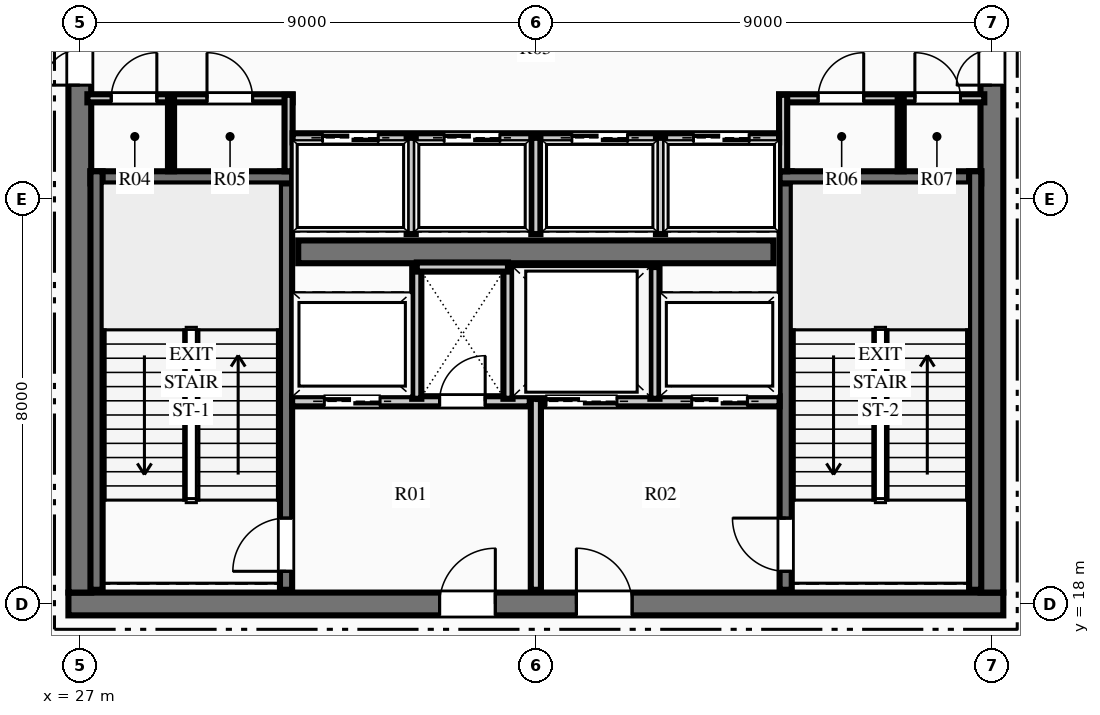
"""IFC4 building model, lengths in metres.
Left out: names, types, materials, properties, quantities, classifications, styles, units other than length and angle.
Written with IfcOpenShell. Run it as: python <this file> out.ifc"""

import sys

from ifc_helpers import new_model, si_unit, direction, frame, frame_2d, origin, place, context, subcontext, project, spatial, rectangle, extrude, element, fill, save


model = new_model("IFC4")
c1 = context("Model", 3, precision=1e-05, world=origin(), true_north=direction((0.0, 1.0)))
c2 = subcontext(c1, "Body", "Model", "MODEL_VIEW")
j1 = project(units=[si_unit("LENGTHUNIT", "METRE"), si_unit("PLANEANGLEUNIT", "RADIAN")], contexts=[c1])
p1 = place(None, origin())
s1 = spatial("IfcSite", under=j1, at=p1, CompositionType="ELEMENT")
p2 = place(p1, origin())
s2 = spatial("IfcBuilding", under=s1, at=p2, CompositionType="ELEMENT")
p3 = place(p2, frame((0.0, 0.0, 298.2)))
s3 = spatial("IfcBuildingStorey", under=s2, at=p3, CompositionType="ELEMENT", Elevation=298.2)
p4 = place(p3, frame((26.775, 18.0, 0.0), z_axis=(0.0, 0.0, 1.0), x_axis=(1.0, 0.0, 0.0)))
e1 = element("IfcWall", 1, at=p4, inside=s3, PredefinedType="SHEAR", context=c2, shape_type="SweptSolid", body=[
    extrude(rectangle(XDim=18.45, YDim=0.45, at=frame_2d((9.225, 0.0))), origin(), (0.0, 0.0, 1.0), 4.5),
])
p5 = place(p4, frame((7.325, 0.0, 0.0)))
e2 = element("IfcOpeningElement", 2, at=p5, cuts=e1, PredefinedType="OPENING", context=c2, shape_type="SweptSolid", body=[
    extrude(rectangle(XDim=1.1, YDim=2.15, at=frame_2d((0.55, 1.075))), frame((0.0, 0.235, 0.0), z_axis=(0.0, -1.0, 0.0), x_axis=(1.0, 0.0, 0.0)), (0.0, 0.0, 1.0), 0.47),
])
p6 = place(p4, frame((10.025, 0.0, 0.0)))
e3 = element("IfcOpeningElement", 3, at=p6, cuts=e1, PredefinedType="OPENING", context=c2, shape_type="SweptSolid", body=[
    extrude(rectangle(XDim=1.1, YDim=2.15, at=frame_2d((0.55, 1.075))), frame((0.0, 0.235, 0.0), z_axis=(0.0, -1.0, 0.0), x_axis=(1.0, 0.0, 0.0)), (0.0, 0.0, 1.0), 0.47),
])
p7 = place(p3, frame((27.0, 18.225, 0.0), z_axis=(0.0, 0.0, 1.0), x_axis=(0.0, 1.0, 0.0)))
e4 = element("IfcWall", 4, at=p7, inside=s3, PredefinedType="SHEAR", context=c2, shape_type="SweptSolid", body=[
    extrude(rectangle(XDim=15.55, YDim=0.45, at=frame_2d((7.775, 0.0))), origin(), (0.0, 0.0, 1.0), 4.5),
])
p8 = place(p7, frame((10.015, 0.0, 0.0)))
e5 = element("IfcOpeningElement", 5, at=p8, cuts=e4, PredefinedType="OPENING", context=c2, shape_type="SweptSolid", body=[
    extrude(rectangle(XDim=1.4, YDim=2.2, at=frame_2d((0.7, 1.1))), frame((0.0, 0.235, 0.0), z_axis=(0.0, -1.0, 0.0), x_axis=(1.0, 0.0, 0.0)), (0.0, 0.0, 1.0), 0.47),
])
p9 = place(p3, frame((45.0, 18.225, 0.0), z_axis=(0.0, 0.0, 1.0), x_axis=(0.0, 1.0, 0.0)))
e6 = element("IfcWall", 6, at=p9, inside=s3, PredefinedType="SHEAR", context=c2, shape_type="SweptSolid", body=[
    extrude(rectangle(XDim=15.55, YDim=0.45, at=frame_2d((7.775, 0.0))), origin(), (0.0, 0.0, 1.0), 4.5),
])
p10 = place(p9, frame((10.015, 0.0, 0.0)))
e7 = element("IfcOpeningElement", 7, at=p10, cuts=e6, PredefinedType="OPENING", context=c2, shape_type="SweptSolid", body=[
    extrude(rectangle(XDim=1.4, YDim=2.2, at=frame_2d((0.7, 1.1))), frame((0.0, 0.235, 0.0), z_axis=(0.0, -1.0, 0.0), x_axis=(1.0, 0.0, 0.0)), (0.0, 0.0, 1.0), 0.47),
])
p11 = place(p3, frame((31.31, 24.95, 0.0), z_axis=(0.0, 0.0, 1.0), x_axis=(1.0, 0.0, 0.0)))
e8 = element("IfcWall", 8, at=p11, inside=s3, PredefinedType="SHEAR", context=c2, shape_type="SweptSolid", body=[
    extrude(rectangle(XDim=9.38, YDim=0.45, at=frame_2d((4.69, 0.0))), origin(), (0.0, 0.0, 1.0), 4.5),
])
p12 = place(p3, frame((31.07, 18.28, 0.0), z_axis=(0.0, 0.0, 1.0), x_axis=(0.0, 1.0, 0.0)))
e9 = element("IfcWall", 9, at=p12, inside=s3, PredefinedType="SHEAR", context=c2, shape_type="SweptSolid", body=[
    extrude(rectangle(XDim=8.26, YDim=0.24, at=frame_2d((4.13, 0.0))), origin(), (0.0, 0.0, 1.0), 4.5),
])
p13 = place(p12, frame((0.365, 0.0, 0.0)))
e10 = element("IfcOpeningElement", 10, at=p13, cuts=e9, PredefinedType="OPENING", context=c2, shape_type="SweptSolid", body=[
    extrude(rectangle(XDim=1.05, YDim=2.15, at=frame_2d((0.525, 1.075))), frame((0.0, 0.13, 0.0), z_axis=(0.0, -1.0, 0.0), x_axis=(1.0, 0.0, 0.0)), (0.0, 0.0, 1.0), 0.26),
])
p14 = place(p3, frame((27.21, 26.42, 0.0), z_axis=(0.0, 0.0, 1.0), x_axis=(1.0, 0.0, 0.0)))
e11 = element("IfcWall", 11, at=p14, inside=s3, PredefinedType="SHEAR", context=c2, shape_type="SweptSolid", body=[
    extrude(rectangle(XDim=3.98, YDim=0.24, at=frame_2d((1.99, 0.0))), origin(), (0.0, 0.0, 1.0), 4.5),
])
p15 = place(p3, frame((27.33, 18.28, 0.0), z_axis=(0.0, 0.0, 1.0), x_axis=(0.0, 1.0, 0.0)))
e12 = element("IfcWall", 12, at=p15, inside=s3, PredefinedType="SHEAR", context=c2, shape_type="SweptSolid", body=[
    extrude(rectangle(XDim=8.26, YDim=0.24, at=frame_2d((4.13, 0.0))), origin(), (0.0, 0.0, 1.0), 4.5),
])
p16 = place(p3, frame((40.93, 18.28, 0.0), z_axis=(0.0, 0.0, 1.0), x_axis=(0.0, 1.0, 0.0)))
e13 = element("IfcWall", 13, at=p16, inside=s3, PredefinedType="SHEAR", context=c2, shape_type="SweptSolid", body=[
    extrude(rectangle(XDim=8.26, YDim=0.24, at=frame_2d((4.13, 0.0))), origin(), (0.0, 0.0, 1.0), 4.5),
])
p17 = place(p16, frame((0.365, 0.0, 0.0)))
e14 = element("IfcOpeningElement", 14, at=p17, cuts=e13, PredefinedType="OPENING", context=c2, shape_type="SweptSolid", body=[
    extrude(rectangle(XDim=1.05, YDim=2.15, at=frame_2d((0.525, 1.075))), frame((0.0, 0.13, 0.0), z_axis=(0.0, -1.0, 0.0), x_axis=(1.0, 0.0, 0.0)), (0.0, 0.0, 1.0), 0.26),
])
p18 = place(p3, frame((40.81, 26.42, 0.0), z_axis=(0.0, 0.0, 1.0), x_axis=(1.0, 0.0, 0.0)))
e15 = element("IfcWall", 15, at=p18, inside=s3, PredefinedType="SHEAR", context=c2, shape_type="SweptSolid", body=[
    extrude(rectangle(XDim=3.98, YDim=0.24, at=frame_2d((1.99, 0.0))), origin(), (0.0, 0.0, 1.0), 4.5),
])
p19 = place(p3, frame((44.67, 18.28, 0.0), z_axis=(0.0, 0.0, 1.0), x_axis=(0.0, 1.0, 0.0)))
e16 = element("IfcWall", 16, at=p19, inside=s3, PredefinedType="SHEAR", context=c2, shape_type="SweptSolid", body=[
    extrude(rectangle(XDim=8.26, YDim=0.24, at=frame_2d((4.13, 0.0))), origin(), (0.0, 0.0, 1.0), 4.5),
])
p20 = place(p3, frame((36.0, 18.28, 0.0), z_axis=(0.0, 0.0, 1.0), x_axis=(0.0, 1.0, 0.0)))
e17 = element("IfcWall", 17, at=p20, inside=s3, PredefinedType="PARTITIONING", context=c2, shape_type="SweptSolid", body=[
    extrude(rectangle(XDim=3.77, YDim=0.2, at=frame_2d((1.885, 0.0))), origin(), (0.0, 0.0, 1.0), 4.24),
])
p21 = place(p3, frame((31.19, 22.0, 0.0), z_axis=(0.0, 0.0, 1.0), x_axis=(1.0, 0.0, 0.0)))
e18 = element("IfcWall", 18, at=p21, inside=s3, PredefinedType="PARTITIONING", context=c2, shape_type="SweptSolid", body=[
    extrude(rectangle(XDim=4.69, YDim=0.2, at=frame_2d((2.345, 0.0))), origin(), (0.0, 0.0, 1.0), 4.24),
])
p22 = place(p21, frame((2.91, 0.0, 0.0)))
e19 = element("IfcOpeningElement", 19, at=p22, cuts=e18, PredefinedType="OPENING", context=c2, shape_type="SweptSolid", body=[
    extrude(rectangle(XDim=0.9, YDim=2.15, at=frame_2d((0.45, 1.075))), frame((0.0, 0.11, 0.0), z_axis=(0.0, -1.0, 0.0), x_axis=(1.0, 0.0, 0.0)), (0.0, 0.0, 1.0), 0.22),
])
p23 = place(p21, frame((0.635, 0.0, 0.0)))
e20 = element("IfcOpeningElement", 20, at=p23, cuts=e18, PredefinedType="OPENING", context=c2, shape_type="SweptSolid", body=[
    extrude(rectangle(XDim=1.1, YDim=2.15, at=frame_2d((0.55, 1.075))), frame((0.0, 0.11, 0.0), z_axis=(0.0, -1.0, 0.0), x_axis=(1.0, 0.0, 0.0)), (0.0, 0.0, 1.0), 0.22),
])
p24 = place(p3, frame((36.12, 22.0, 0.0), z_axis=(0.0, 0.0, 1.0), x_axis=(1.0, 0.0, 0.0)))
e21 = element("IfcWall", 21, at=p24, inside=s3, PredefinedType="PARTITIONING", context=c2, shape_type="SweptSolid", body=[
    extrude(rectangle(XDim=4.69, YDim=0.2, at=frame_2d((2.345, 0.0))), origin(), (0.0, 0.0, 1.0), 4.24),
])
p25 = place(p24, frame((2.955, 0.0, 0.0)))
e22 = element("IfcOpeningElement", 22, at=p25, cuts=e21, PredefinedType="OPENING", context=c2, shape_type="SweptSolid", body=[
    extrude(rectangle(XDim=1.1, YDim=2.15, at=frame_2d((0.55, 1.075))), frame((0.0, 0.11, 0.0), z_axis=(0.0, -1.0, 0.0), x_axis=(1.0, 0.0, 0.0)), (0.0, 0.0, 1.0), 0.22),
])
p26 = place(p24, frame((0.08, 0.0, 0.0)))
e23 = element("IfcOpeningElement", 23, at=p26, cuts=e21, PredefinedType="OPENING", context=c2, shape_type="SweptSolid", body=[
    extrude(rectangle(XDim=1.4, YDim=2.2, at=frame_2d((0.7, 1.1))), frame((0.0, 0.11, 0.0), z_axis=(0.0, -1.0, 0.0), x_axis=(1.0, 0.0, 0.0)), (0.0, 0.0, 1.0), 0.22),
])
for number, where, z_axis, x_axis in (
    (24, (33.65, 22.05, 0.0), (0.0, 0.0, 1.0), (0.0, 1.0, 0.0)),
    (25, (35.45, 22.05, 0.0), (0.0, 0.0, 1.0), (0.0, 1.0, 0.0)),
):
    element("IfcWall", number, at=place(p3, frame(where, z_axis=z_axis, x_axis=x_axis)), inside=s3, PredefinedType="PARTITIONING", context=c2, shape_type="SweptSolid", body=[
        extrude(rectangle(XDim=2.6, YDim=0.18, at=frame_2d((1.3, 0.0))), origin(), (0.0, 0.0, 1.0), 4.24),
    ])
p27 = place(p3, frame((33.65, 24.65, 0.0), z_axis=(0.0, 0.0, 1.0), x_axis=(1.0, 0.0, 0.0)))
e26 = element("IfcWall", 26, at=p27, inside=s3, PredefinedType="PARTITIONING", context=c2, shape_type="SweptSolid", body=[
    extrude(rectangle(XDim=1.8, YDim=0.18, at=frame_2d((0.9, 0.0))), origin(), (0.0, 0.0, 1.0), 4.24),
])
p28 = place(p3, frame((38.35, 22.05, 0.0), z_axis=(0.0, 0.0, 1.0), x_axis=(0.0, 1.0, 0.0)))
e27 = element("IfcWall", 27, at=p28, inside=s3, PredefinedType="PARTITIONING", context=c2, shape_type="SweptSolid", body=[
    extrude(rectangle(XDim=2.6, YDim=0.18, at=frame_2d((1.3, 0.0))), origin(), (0.0, 0.0, 1.0), 4.24),
])
p29 = place(p3, frame((27.15, 27.98, 0.0), z_axis=(0.0, 0.0, 1.0), x_axis=(1.0, 0.0, 0.0)))
e28 = element("IfcWall", 28, at=p29, inside=s3, PredefinedType="PARTITIONING", context=c2, shape_type="SweptSolid", body=[
    extrude(rectangle(XDim=4.05, YDim=0.16, at=frame_2d((2.025, 0.0))), origin(), (0.0, 0.0, 1.0), 4.24),
])
p30 = place(p29, frame((0.47, 0.0, 0.0)))
e29 = element("IfcOpeningElement", 29, at=p30, cuts=e28, PredefinedType="OPENING", context=c2, shape_type="SweptSolid", body=[
    extrude(rectangle(XDim=0.9, YDim=2.15, at=frame_2d((0.45, 1.075))), frame((0.0, 0.09, 0.0), z_axis=(0.0, -1.0, 0.0), x_axis=(1.0, 0.0, 0.0)), (0.0, 0.0, 1.0), 0.18),
])
p31 = place(p29, frame((2.36, 0.0, 0.0)))
e30 = element("IfcOpeningElement", 30, at=p31, cuts=e28, PredefinedType="OPENING", context=c2, shape_type="SweptSolid", body=[
    extrude(rectangle(XDim=0.9, YDim=2.15, at=frame_2d((0.45, 1.075))), frame((0.0, 0.09, 0.0), z_axis=(0.0, -1.0, 0.0), x_axis=(1.0, 0.0, 0.0)), (0.0, 0.0, 1.0), 0.18),
])
p32 = place(p3, frame((31.12, 26.54, 0.0), z_axis=(0.0, 0.0, 1.0), x_axis=(0.0, 1.0, 0.0)))
e31 = element("IfcWall", 31, at=p32, inside=s3, PredefinedType="PARTITIONING", context=c2, shape_type="SweptSolid", body=[
    extrude(rectangle(XDim=1.51, YDim=0.16, at=frame_2d((0.755, 0.0))), origin(), (0.0, 0.0, 1.0), 4.24),
])
p33 = place(p3, frame((40.8, 27.98, 0.0), z_axis=(0.0, 0.0, 1.0), x_axis=(1.0, 0.0, 0.0)))
e32 = element("IfcWall", 32, at=p33, inside=s3, PredefinedType="PARTITIONING", context=c2, shape_type="SweptSolid", body=[
    extrude(rectangle(XDim=4.05, YDim=0.16, at=frame_2d((2.025, 0.0))), origin(), (0.0, 0.0, 1.0), 4.24),
])
p34 = place(p33, frame((0.77, 0.0, 0.0)))
e33 = element("IfcOpeningElement", 33, at=p34, cuts=e32, PredefinedType="OPENING", context=c2, shape_type="SweptSolid", body=[
    extrude(rectangle(XDim=0.9, YDim=2.15, at=frame_2d((0.45, 1.075))), frame((0.0, 0.09, 0.0), z_axis=(0.0, -1.0, 0.0), x_axis=(1.0, 0.0, 0.0)), (0.0, 0.0, 1.0), 0.18),
])
p35 = place(p33, frame((2.68, 0.0, 0.0)))
e34 = element("IfcOpeningElement", 34, at=p35, cuts=e32, PredefinedType="OPENING", context=c2, shape_type="SweptSolid", body=[
    extrude(rectangle(XDim=0.9, YDim=2.15, at=frame_2d((0.45, 1.075))), frame((0.0, 0.09, 0.0), z_axis=(0.0, -1.0, 0.0), x_axis=(1.0, 0.0, 0.0)), (0.0, 0.0, 1.0), 0.18),
])
p36 = place(p3, frame((40.88, 26.54, 0.0), z_axis=(0.0, 0.0, 1.0), x_axis=(0.0, 1.0, 0.0)))
e35 = element("IfcWall", 35, at=p36, inside=s3, PredefinedType="PARTITIONING", context=c2, shape_type="SweptSolid", body=[
    extrude(rectangle(XDim=1.51, YDim=0.16, at=frame_2d((0.755, 0.0))), origin(), (0.0, 0.0, 1.0), 4.24),
])
for number, where, z_axis, x_axis in (
    (36, (28.8, 26.54, 0.0), (0.0, 0.0, 1.0), (0.0, 1.0, 0.0)),
    (37, (43.2, 26.54, 0.0), (0.0, 0.0, 1.0), (0.0, 1.0, 0.0)),
):
    element("IfcWall", number, at=place(p3, frame(where, z_axis=z_axis, x_axis=x_axis)), inside=s3, PredefinedType="PARTITIONING", context=c2, shape_type="SweptSolid", body=[
        extrude(rectangle(XDim=1.44, YDim=0.12, at=frame_2d((0.72, 0.0))), origin(), (0.0, 0.0, 1.0), 4.24),
    ])
p37 = place(p3, frame((31.2, 27.2, 0.0), z_axis=(0.0, 0.0, 1.0), x_axis=(1.0, 0.0, 0.0)))
e38 = element("IfcWall", 38, at=p37, inside=s3, PredefinedType="PARTITIONING", context=c2, shape_type="SweptSolid", body=[
    extrude(rectangle(XDim=9.6, YDim=0.18, at=frame_2d((4.8, 0.0))), origin(), (0.0, 0.0, 1.0), 4.24),
])
p38 = place(p37, frame((0.59, 0.0, 0.0)))
e39 = element("IfcOpeningElement", 39, at=p38, cuts=e38, PredefinedType="OPENING", context=c2, shape_type="SweptSolid", body=[
    extrude(rectangle(XDim=1.1, YDim=2.15, at=frame_2d((0.55, 1.075))), frame((0.0, 0.1, 0.0), z_axis=(0.0, -1.0, 0.0), x_axis=(1.0, 0.0, 0.0)), (0.0, 0.0, 1.0), 0.2),
])
p39 = place(p37, frame((2.99, 0.0, 0.0)))
e40 = element("IfcOpeningElement", 40, at=p39, cuts=e38, PredefinedType="OPENING", context=c2, shape_type="SweptSolid", body=[
    extrude(rectangle(XDim=1.1, YDim=2.15, at=frame_2d((0.55, 1.075))), frame((0.0, 0.1, 0.0), z_axis=(0.0, -1.0, 0.0), x_axis=(1.0, 0.0, 0.0)), (0.0, 0.0, 1.0), 0.2),
])
p40 = place(p37, frame((5.51, 0.0, 0.0)))
e41 = element("IfcOpeningElement", 41, at=p40, cuts=e38, PredefinedType="OPENING", context=c2, shape_type="SweptSolid", body=[
    extrude(rectangle(XDim=1.1, YDim=2.15, at=frame_2d((0.55, 1.075))), frame((0.0, 0.1, 0.0), z_axis=(0.0, -1.0, 0.0), x_axis=(1.0, 0.0, 0.0)), (0.0, 0.0, 1.0), 0.2),
])
p41 = place(p37, frame((7.91, 0.0, 0.0)))
e42 = element("IfcOpeningElement", 42, at=p41, cuts=e38, PredefinedType="OPENING", context=c2, shape_type="SweptSolid", body=[
    extrude(rectangle(XDim=1.1, YDim=2.15, at=frame_2d((0.55, 1.075))), frame((0.0, 0.1, 0.0), z_axis=(0.0, -1.0, 0.0), x_axis=(1.0, 0.0, 0.0)), (0.0, 0.0, 1.0), 0.2),
])
for number, where, z_axis, x_axis in (
    (43, (33.54, 25.3, 0.0), (0.0, 0.0, 1.0), (0.0, 1.0, 0.0)),
    (44, (36.0, 25.3, 0.0), (0.0, 0.0, 1.0), (0.0, 1.0, 0.0)),
    (45, (38.46, 25.3, 0.0), (0.0, 0.0, 1.0), (0.0, 1.0, 0.0)),
):
    element("IfcWall", number, at=place(p3, frame(where, z_axis=z_axis, x_axis=x_axis)), inside=s3, PredefinedType="PARTITIONING", context=c2, shape_type="SweptSolid", body=[
        extrude(rectangle(XDim=1.9, YDim=0.18, at=frame_2d((0.95, 0.0))), origin(), (0.0, 0.0, 1.0), 4.24),
    ])
p42 = place(p30, origin())
e46 = element("IfcDoor", 46, at=p42, inside=s3, OperationType="SINGLE_SWING_RIGHT", PredefinedType="DOOR", context=c2, shape_type="SweptSolid", body=[
    extrude(rectangle(XDim=0.9, YDim=2.15, at=frame_2d((0.45, 1.075))), frame((0.0, 0.025, 0.0), z_axis=(0.0, -1.0, 0.0), x_axis=(1.0, 0.0, 0.0)), (0.0, 0.0, 1.0), 0.05),
])
fill(e29, e46)
p43 = place(p31, origin())
e47 = element("IfcDoor", 47, at=p43, inside=s3, OperationType="SINGLE_SWING_LEFT", PredefinedType="DOOR", context=c2, shape_type="SweptSolid", body=[
    extrude(rectangle(XDim=0.9, YDim=2.15, at=frame_2d((0.45, 1.075))), frame((0.0, 0.025, 0.0), z_axis=(0.0, -1.0, 0.0), x_axis=(1.0, 0.0, 0.0)), (0.0, 0.0, 1.0), 0.05),
])
fill(e30, e47)
p44 = place(p34, origin())
e48 = element("IfcDoor", 48, at=p44, inside=s3, OperationType="SINGLE_SWING_RIGHT", PredefinedType="DOOR", context=c2, shape_type="SweptSolid", body=[
    extrude(rectangle(XDim=0.9, YDim=2.15, at=frame_2d((0.45, 1.075))), frame((0.0, 0.025, 0.0), z_axis=(0.0, -1.0, 0.0), x_axis=(1.0, 0.0, 0.0)), (0.0, 0.0, 1.0), 0.05),
])
fill(e33, e48)
p45 = place(p35, origin())
e49 = element("IfcDoor", 49, at=p45, inside=s3, OperationType="SINGLE_SWING_LEFT", PredefinedType="DOOR", context=c2, shape_type="SweptSolid", body=[
    extrude(rectangle(XDim=0.9, YDim=2.15, at=frame_2d((0.45, 1.075))), frame((0.0, 0.025, 0.0), z_axis=(0.0, -1.0, 0.0), x_axis=(1.0, 0.0, 0.0)), (0.0, 0.0, 1.0), 0.05),
])
fill(e34, e49)
p46 = place(p13, origin())
e50 = element("IfcDoor", 50, at=p46, inside=s3, OperationType="SINGLE_SWING_LEFT", PredefinedType="DOOR", context=c2, shape_type="SweptSolid", body=[
    extrude(rectangle(XDim=1.05, YDim=2.15, at=frame_2d((0.525, 1.075))), frame((0.0, 0.025, 0.0), z_axis=(0.0, -1.0, 0.0), x_axis=(1.0, 0.0, 0.0)), (0.0, 0.0, 1.0), 0.05),
])
fill(e10, e50)
p47 = place(p17, origin())
e51 = element("IfcDoor", 51, at=p47, inside=s3, OperationType="SINGLE_SWING_RIGHT", PredefinedType="DOOR", context=c2, shape_type="SweptSolid", body=[
    extrude(rectangle(XDim=1.05, YDim=2.15, at=frame_2d((0.525, 1.075))), frame((0.0, 0.025, 0.0), z_axis=(0.0, -1.0, 0.0), x_axis=(1.0, 0.0, 0.0)), (0.0, 0.0, 1.0), 0.05),
])
fill(e14, e51)
p48 = place(p5, origin())
e52 = element("IfcDoor", 52, at=p48, inside=s3, OperationType="SINGLE_SWING_RIGHT", PredefinedType="DOOR", context=c2, shape_type="SweptSolid", body=[
    extrude(rectangle(XDim=1.1, YDim=2.15, at=frame_2d((0.55, 1.075))), frame((0.0, 0.025, 0.0), z_axis=(0.0, -1.0, 0.0), x_axis=(1.0, 0.0, 0.0)), (0.0, 0.0, 1.0), 0.05),
])
fill(e2, e52)
p49 = place(p6, origin())
e53 = element("IfcDoor", 53, at=p49, inside=s3, OperationType="SINGLE_SWING_LEFT", PredefinedType="DOOR", context=c2, shape_type="SweptSolid", body=[
    extrude(rectangle(XDim=1.1, YDim=2.15, at=frame_2d((0.55, 1.075))), frame((0.0, 0.025, 0.0), z_axis=(0.0, -1.0, 0.0), x_axis=(1.0, 0.0, 0.0)), (0.0, 0.0, 1.0), 0.05),
])
fill(e3, e53)
p50 = place(p22, origin())
e54 = element("IfcDoor", 54, at=p50, inside=s3, OperationType="SINGLE_SWING_RIGHT", PredefinedType="DOOR", context=c2, shape_type="SweptSolid", body=[
    extrude(rectangle(XDim=0.9, YDim=2.15, at=frame_2d((0.45, 1.075))), frame((0.0, 0.025, 0.0), z_axis=(0.0, -1.0, 0.0), x_axis=(1.0, 0.0, 0.0)), (0.0, 0.0, 1.0), 0.05),
])
fill(e19, e54)
p51 = place(p8, origin())
e55 = element("IfcDoor", 55, at=p51, inside=s3, OperationType="DOUBLE_DOOR_SINGLE_SWING", PredefinedType="DOOR", context=c2, shape_type="SweptSolid", body=[
    extrude(rectangle(XDim=1.4, YDim=2.2, at=frame_2d((0.7, 1.1))), frame((0.0, 0.025, 0.0), z_axis=(0.0, -1.0, 0.0), x_axis=(1.0, 0.0, 0.0)), (0.0, 0.0, 1.0), 0.05),
])
fill(e5, e55)
p52 = place(p10, origin())
e56 = element("IfcDoor", 56, at=p52, inside=s3, OperationType="DOUBLE_DOOR_SINGLE_SWING", PredefinedType="DOOR", context=c2, shape_type="SweptSolid", body=[
    extrude(rectangle(XDim=1.4, YDim=2.2, at=frame_2d((0.7, 1.1))), frame((0.0, 0.025, 0.0), z_axis=(0.0, -1.0, 0.0), x_axis=(1.0, 0.0, 0.0)), (0.0, 0.0, 1.0), 0.05),
])
fill(e7, e56)
p53 = place(p38, origin())
e57 = element("IfcDoor", 57, at=p53, inside=s3, OperationType="SLIDING_TO_LEFT", PredefinedType="DOOR", context=c2, shape_type="SweptSolid", body=[
    extrude(rectangle(XDim=1.1, YDim=2.15, at=frame_2d((0.55, 1.075))), frame((0.0, 0.025, 0.0), z_axis=(0.0, -1.0, 0.0), x_axis=(1.0, 0.0, 0.0)), (0.0, 0.0, 1.0), 0.05),
])
fill(e39, e57)
p54 = place(p39, origin())
e58 = element("IfcDoor", 58, at=p54, inside=s3, OperationType="SLIDING_TO_LEFT", PredefinedType="DOOR", context=c2, shape_type="SweptSolid", body=[
    extrude(rectangle(XDim=1.1, YDim=2.15, at=frame_2d((0.55, 1.075))), frame((0.0, 0.025, 0.0), z_axis=(0.0, -1.0, 0.0), x_axis=(1.0, 0.0, 0.0)), (0.0, 0.0, 1.0), 0.05),
])
fill(e40, e58)
p55 = place(p40, origin())
e59 = element("IfcDoor", 59, at=p55, inside=s3, OperationType="SLIDING_TO_LEFT", PredefinedType="DOOR", context=c2, shape_type="SweptSolid", body=[
    extrude(rectangle(XDim=1.1, YDim=2.15, at=frame_2d((0.55, 1.075))), frame((0.0, 0.025, 0.0), z_axis=(0.0, -1.0, 0.0), x_axis=(1.0, 0.0, 0.0)), (0.0, 0.0, 1.0), 0.05),
])
fill(e41, e59)
p56 = place(p41, origin())
e60 = element("IfcDoor", 60, at=p56, inside=s3, OperationType="SLIDING_TO_LEFT", PredefinedType="DOOR", context=c2, shape_type="SweptSolid", body=[
    extrude(rectangle(XDim=1.1, YDim=2.15, at=frame_2d((0.55, 1.075))), frame((0.0, 0.025, 0.0), z_axis=(0.0, -1.0, 0.0), x_axis=(1.0, 0.0, 0.0)), (0.0, 0.0, 1.0), 0.05),
])
fill(e42, e60)
p57 = place(p23, origin())
e61 = element("IfcDoor", 61, at=p57, inside=s3, OperationType="SLIDING_TO_LEFT", PredefinedType="DOOR", context=c2, shape_type="SweptSolid", body=[
    extrude(rectangle(XDim=1.1, YDim=2.15, at=frame_2d((0.55, 1.075))), frame((0.0, 0.025, 0.0), z_axis=(0.0, -1.0, 0.0), x_axis=(1.0, 0.0, 0.0)), (0.0, 0.0, 1.0), 0.05),
])
fill(e20, e61)
p58 = place(p25, origin())
e62 = element("IfcDoor", 62, at=p58, inside=s3, OperationType="SLIDING_TO_LEFT", PredefinedType="DOOR", context=c2, shape_type="SweptSolid", body=[
    extrude(rectangle(XDim=1.1, YDim=2.15, at=frame_2d((0.55, 1.075))), frame((0.0, 0.025, 0.0), z_axis=(0.0, -1.0, 0.0), x_axis=(1.0, 0.0, 0.0)), (0.0, 0.0, 1.0), 0.05),
])
fill(e22, e62)
p59 = place(p26, origin())
e63 = element("IfcDoor", 63, at=p59, inside=s3, OperationType="SLIDING_TO_LEFT", PredefinedType="DOOR", context=c2, shape_type="SweptSolid", body=[
    extrude(rectangle(XDim=1.4, YDim=2.2, at=frame_2d((0.7, 1.1))), frame((0.0, 0.025, 0.0), z_axis=(0.0, -1.0, 0.0), x_axis=(1.0, 0.0, 0.0)), (0.0, 0.0, 1.0), 0.05),
])
fill(e23, e63)
save(model, sys.argv[1])
